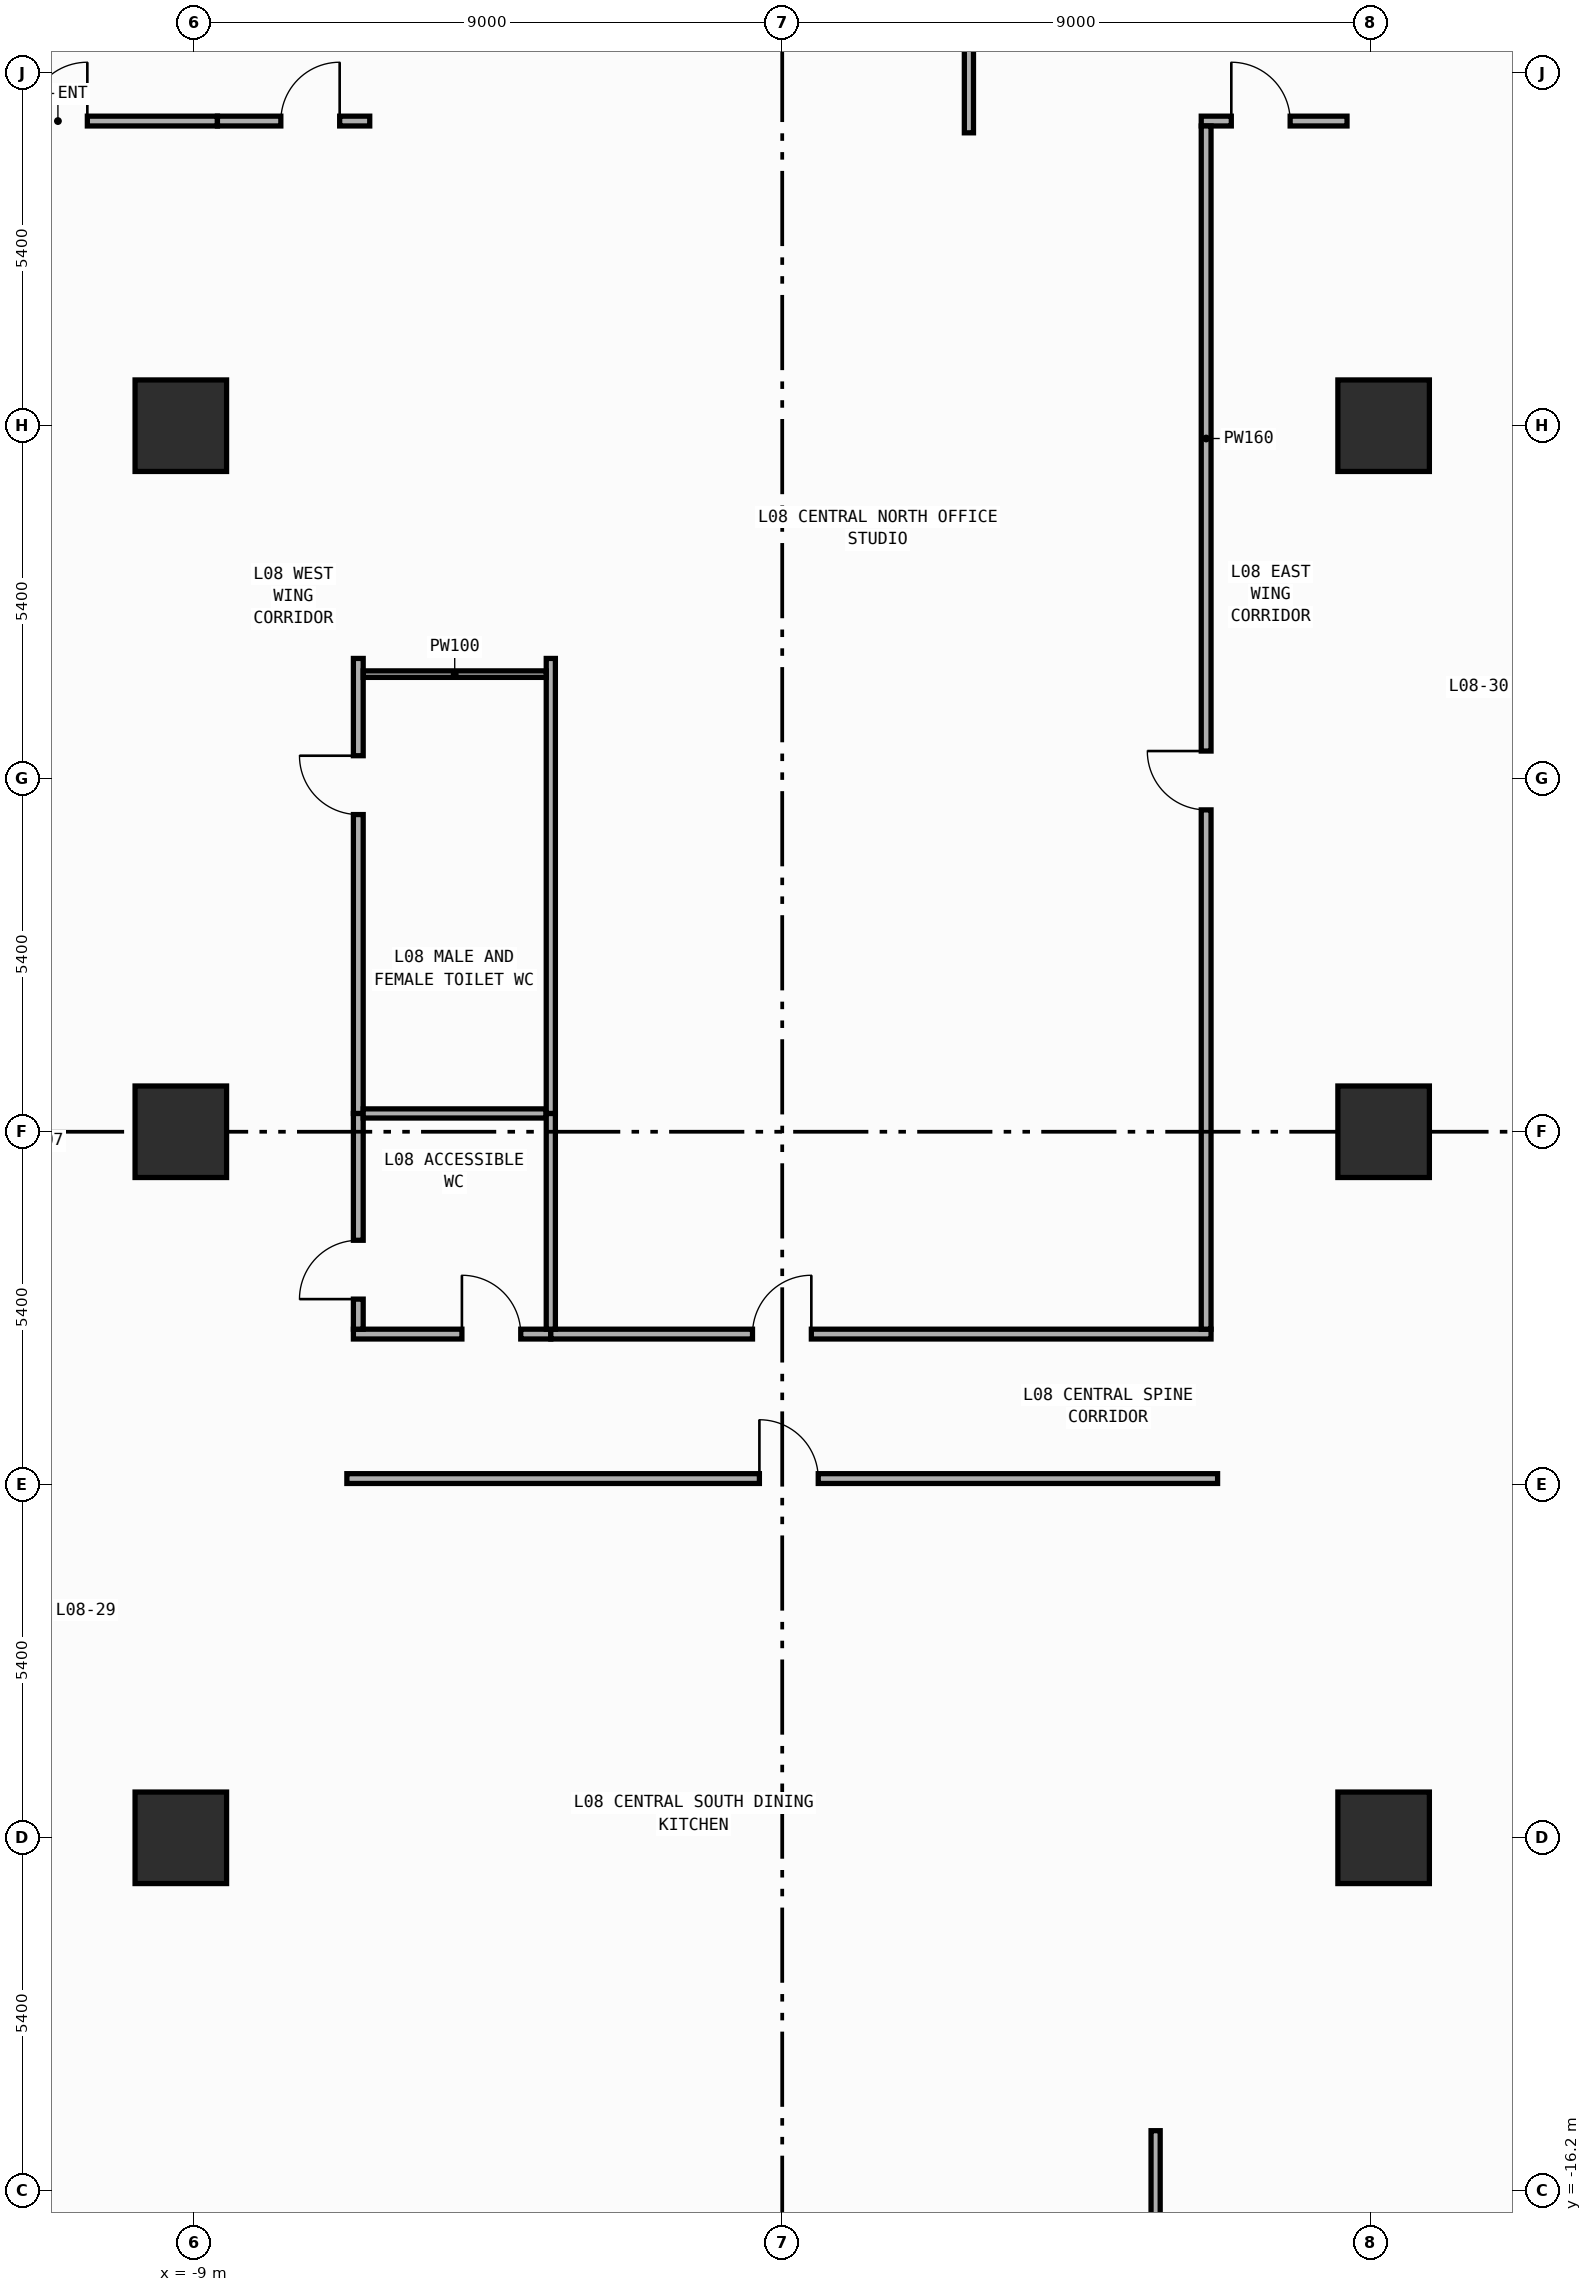
"""IFC4 building model, lengths in metres.
Left out: names, types, materials, properties, quantities, classifications, styles, units other than length and angle.
Written with IfcOpenShell. Run it as: python <this file> out.ifc"""

import sys

from ifc_helpers import new_model, si_unit, direction, frame, frame_2d, origin, origin_2d, place, context, subcontext, project, spatial, rectangle, extrude, element, fill, save


model = new_model("IFC4")
c1 = context("Model", 3, precision=1e-05, world=origin(), true_north=direction((0.0, 1.0)))
c2 = subcontext(c1, "Body", "Model", "MODEL_VIEW")
j1 = project(units=[si_unit("LENGTHUNIT", "METRE"), si_unit("PLANEANGLEUNIT", "RADIAN")], contexts=[c1])
p1 = place(None, origin())
s1 = spatial("IfcSite", under=j1, at=p1, CompositionType="ELEMENT")
p2 = place(p1, origin())
s2 = spatial("IfcBuilding", under=s1, at=p2, CompositionType="ELEMENT")
p3 = place(p2, frame((0.0, 0.0, 34.4)))
s3 = spatial("IfcBuildingStorey", under=s2, at=p3, CompositionType="ELEMENT", Elevation=34.4)
for number, where, z_axis, x_axis in (
    (1, (-9.2, -10.8, 0.0), (0.0, 0.0, 1.0), (1.0, 0.0, 0.0)),
    (2, (-9.2, 0.0, 0.0), (0.0, 0.0, 1.0), (1.0, 0.0, 0.0)),
    (3, (-9.2, 10.8, 0.0), (0.0, 0.0, 1.0), (1.0, 0.0, 0.0)),
    (4, (9.2, -10.8, 0.0), (0.0, 0.0, 1.0), (1.0, 0.0, 0.0)),
    (5, (9.2, 0.0, 0.0), (0.0, 0.0, 1.0), (1.0, 0.0, 0.0)),
    (6, (9.2, 10.8, 0.0), (0.0, 0.0, 1.0), (1.0, 0.0, 0.0)),
):
    element("IfcColumn", number, at=place(p3, frame(where, z_axis=z_axis, x_axis=x_axis)), inside=s3, PredefinedType="COLUMN", context=c2, shape_type="SweptSolid", body=[
        extrude(rectangle(XDim=1.4, YDim=1.4, at=origin_2d()), origin(), (0.0, 0.0, 1.0), 4.2),
    ])
p4 = place(p3, frame((-11.99, 15.46, 0.0), z_axis=(0.0, 0.0, 1.0), x_axis=(1.0, 0.0, 0.0)))
e7 = element("IfcWall", 7, at=p4, inside=s3, PredefinedType="PARTITIONING", context=c2, shape_type="SweptSolid", body=[
    extrude(rectangle(XDim=3.35, YDim=0.15, at=frame_2d((1.675, 0.0))), origin(), (0.0, 0.0, 1.0), 3.94),
])
p5 = place(p4, frame((0.46, 0.0, 0.0)))
e8 = element("IfcOpeningElement", 8, at=p5, cuts=e7, PredefinedType="OPENING", context=c2, shape_type="SweptSolid", body=[
    extrude(rectangle(XDim=0.9, YDim=2.15, at=frame_2d((0.45, 1.075))), frame((0.0, 0.085, 0.0), z_axis=(0.0, -1.0, 0.0), x_axis=(1.0, 0.0, 0.0)), (0.0, 0.0, 1.0), 0.17),
])
p6 = place(p3, frame((-6.56, -3.095, 0.0), z_axis=(0.0, 0.0, 1.0), x_axis=(1.0, 0.0, 0.0)))
e9 = element("IfcWall", 9, at=p6, inside=s3, PredefinedType="PARTITIONING", context=c2, shape_type="SweptSolid", body=[
    extrude(rectangle(XDim=3.02, YDim=0.15, at=frame_2d((1.51, 0.0))), origin(), (0.0, 0.0, 1.0), 3.94),
])
p7 = place(p6, frame((1.66, 0.0, 0.0)))
e10 = element("IfcOpeningElement", 10, at=p7, cuts=e9, PredefinedType="OPENING", context=c2, shape_type="SweptSolid", body=[
    extrude(rectangle(XDim=0.9, YDim=2.15, at=frame_2d((0.45, 1.075))), frame((0.0, 0.085, 0.0), z_axis=(0.0, -1.0, 0.0), x_axis=(1.0, 0.0, 0.0)), (0.0, 0.0, 1.0), 0.17),
])
p8 = place(p3, frame((-3.54, -3.095, 0.0), z_axis=(0.0, 0.0, 1.0), x_axis=(1.0, 0.0, 0.0)))
e11 = element("IfcWall", 11, at=p8, inside=s3, PredefinedType="PARTITIONING", context=c2, shape_type="SweptSolid", body=[
    extrude(rectangle(XDim=10.1, YDim=0.15, at=frame_2d((5.05, 0.0))), origin(), (0.0, 0.0, 1.0), 3.94),
])
p9 = place(p8, frame((3.085, 0.0, 0.0)))
e12 = element("IfcOpeningElement", 12, at=p9, cuts=e11, PredefinedType="OPENING", context=c2, shape_type="SweptSolid", body=[
    extrude(rectangle(XDim=0.9, YDim=2.15, at=frame_2d((0.45, 1.075))), frame((0.0, 0.085, 0.0), z_axis=(0.0, -1.0, 0.0), x_axis=(1.0, 0.0, 0.0)), (0.0, 0.0, 1.0), 0.17),
])
p10 = place(p3, frame((-6.66, -5.305, 0.0), z_axis=(0.0, 0.0, 1.0), x_axis=(1.0, 0.0, 0.0)))
e13 = element("IfcWall", 13, at=p10, inside=s3, PredefinedType="PARTITIONING", context=c2, shape_type="SweptSolid", body=[
    extrude(rectangle(XDim=13.32, YDim=0.15, at=frame_2d((6.66, 0.0))), origin(), (0.0, 0.0, 1.0), 3.94),
])
p11 = place(p10, frame((6.311, 0.0, 0.0)))
e14 = element("IfcOpeningElement", 14, at=p11, cuts=e13, PredefinedType="OPENING", context=c2, shape_type="SweptSolid", body=[
    extrude(rectangle(XDim=0.9, YDim=2.15, at=frame_2d((0.45, 1.075))), frame((0.0, 0.085, 0.0), z_axis=(0.0, -1.0, 0.0), x_axis=(1.0, 0.0, 0.0)), (0.0, 0.0, 1.0), 0.17),
])
p12 = place(p3, frame((-8.64, 15.46, 0.0), z_axis=(0.0, 0.0, 1.0), x_axis=(1.0, 0.0, 0.0)))
e15 = element("IfcWall", 15, at=p12, inside=s3, PredefinedType="PARTITIONING", context=c2, shape_type="SweptSolid", body=[
    extrude(rectangle(XDim=2.33, YDim=0.15, at=frame_2d((1.165, 0.0))), origin(), (0.0, 0.0, 1.0), 3.94),
])
p13 = place(p12, frame((0.97, 0.0, 0.0)))
e16 = element("IfcOpeningElement", 16, at=p13, cuts=e15, PredefinedType="OPENING", context=c2, shape_type="SweptSolid", body=[
    extrude(rectangle(XDim=0.9, YDim=2.15, at=frame_2d((0.45, 1.075))), frame((0.0, 0.085, 0.0), z_axis=(0.0, -1.0, 0.0), x_axis=(1.0, 0.0, 0.0)), (0.0, 0.0, 1.0), 0.17),
])
p14 = place(p3, frame((-6.485, -3.02, 0.0), z_axis=(0.0, 0.0, 1.0), x_axis=(0.0, 1.0, 0.0)))
e17 = element("IfcWall", 17, at=p14, inside=s3, PredefinedType="PARTITIONING", context=c2, shape_type="SweptSolid", body=[
    extrude(rectangle(XDim=3.3, YDim=0.15, at=frame_2d((1.65, 0.0))), origin(), (0.0, 0.0, 1.0), 3.94),
])
p15 = place(p14, frame((0.46, 0.0, 0.0)))
e18 = element("IfcOpeningElement", 18, at=p15, cuts=e17, PredefinedType="OPENING", context=c2, shape_type="SweptSolid", body=[
    extrude(rectangle(XDim=0.9, YDim=2.15, at=frame_2d((0.45, 1.075))), frame((0.0, 0.085, 0.0), z_axis=(0.0, -1.0, 0.0), x_axis=(1.0, 0.0, 0.0)), (0.0, 0.0, 1.0), 0.17),
])
p16 = place(p3, frame((-6.485, 0.28, 0.0), z_axis=(0.0, 0.0, 1.0), x_axis=(0.0, 1.0, 0.0)))
e19 = element("IfcWall", 19, at=p16, inside=s3, PredefinedType="PARTITIONING", context=c2, shape_type="SweptSolid", body=[
    extrude(rectangle(XDim=6.96, YDim=0.15, at=frame_2d((3.48, 0.0))), origin(), (0.0, 0.0, 1.0), 3.94),
])
p17 = place(p16, frame((4.572, 0.0, 0.0)))
e20 = element("IfcOpeningElement", 20, at=p17, cuts=e19, PredefinedType="OPENING", context=c2, shape_type="SweptSolid", body=[
    extrude(rectangle(XDim=0.9, YDim=2.15, at=frame_2d((0.45, 1.075))), frame((0.0, 0.085, 0.0), z_axis=(0.0, -1.0, 0.0), x_axis=(1.0, 0.0, 0.0)), (0.0, 0.0, 1.0), 0.17),
])
p18 = place(p3, frame((6.41, 15.46, 0.0), z_axis=(0.0, 0.0, 1.0), x_axis=(1.0, 0.0, 0.0)))
e21 = element("IfcWall", 21, at=p18, inside=s3, PredefinedType="PARTITIONING", context=c2, shape_type="SweptSolid", body=[
    extrude(rectangle(XDim=2.23, YDim=0.15, at=frame_2d((1.115, 0.0))), origin(), (0.0, 0.0, 1.0), 3.94),
])
p19 = place(p18, frame((0.46, 0.0, 0.0)))
e22 = element("IfcOpeningElement", 22, at=p19, cuts=e21, PredefinedType="OPENING", context=c2, shape_type="SweptSolid", body=[
    extrude(rectangle(XDim=0.9, YDim=2.15, at=frame_2d((0.45, 1.075))), frame((0.0, 0.085, 0.0), z_axis=(0.0, -1.0, 0.0), x_axis=(1.0, 0.0, 0.0)), (0.0, 0.0, 1.0), 0.17),
])
p20 = place(p3, frame((6.485, -3.02, 0.0), z_axis=(0.0, 0.0, 1.0), x_axis=(0.0, 1.0, 0.0)))
e23 = element("IfcWall", 23, at=p20, inside=s3, PredefinedType="PARTITIONING", context=c2, shape_type="SweptSolid", body=[
    extrude(rectangle(XDim=18.405, YDim=0.15, at=frame_2d((9.203, 0.0))), origin(), (0.0, 0.0, 1.0), 3.94),
])
p21 = place(p20, frame((7.944, 0.0, 0.0)))
e24 = element("IfcOpeningElement", 24, at=p21, cuts=e23, PredefinedType="OPENING", context=c2, shape_type="SweptSolid", body=[
    extrude(rectangle(XDim=0.9, YDim=2.15, at=frame_2d((0.45, 1.075))), frame((0.0, 0.085, 0.0), z_axis=(0.0, -1.0, 0.0), x_axis=(1.0, 0.0, 0.0)), (0.0, 0.0, 1.0), 0.17),
])
p22 = place(p3, frame((2.856, 15.28, 0.0), z_axis=(0.0, 0.0, 1.0), x_axis=(0.0, 1.0, 0.0)))
e25 = element("IfcWall", 25, at=p22, inside=s3, PredefinedType="PARTITIONING", context=c2, shape_type="SweptSolid", body=[
    extrude(rectangle(XDim=11.575, YDim=0.14, at=frame_2d((5.788, 0.0))), origin(), (0.0, 0.0, 1.0), 3.94),
])
p23 = place(p3, frame((5.712, -26.737, 0.0), z_axis=(0.0, 0.0, 1.0), x_axis=(0.0, 1.0, 0.0)))
e26 = element("IfcWall", 26, at=p23, inside=s3, PredefinedType="PARTITIONING", context=c2, shape_type="SweptSolid", body=[
    extrude(rectangle(XDim=11.457, YDim=0.14, at=frame_2d((5.729, 0.0))), origin(), (0.0, 0.0, 1.0), 3.94),
])
p24 = place(p23, frame((0.46, 0.0, 0.0)))
e27 = element("IfcOpeningElement", 27, at=p24, cuts=e26, PredefinedType="OPENING", context=c2, shape_type="SweptSolid", body=[
    extrude(rectangle(XDim=0.85, YDim=2.1, at=frame_2d((0.425, 1.05))), frame((0.0, 0.08, 0.0), z_axis=(0.0, -1.0, 0.0), x_axis=(1.0, 0.0, 0.0)), (0.0, 0.0, 1.0), 0.16),
])
p25 = place(p3, frame((-6.41, 0.28, 0.0), z_axis=(0.0, 0.0, 1.0), x_axis=(1.0, 0.0, 0.0)))
e28 = element("IfcWall", 28, at=p25, inside=s3, PredefinedType="PARTITIONING", context=c2, shape_type="SweptSolid", body=[
    extrude(rectangle(XDim=2.8, YDim=0.14, at=frame_2d((1.4, 0.0))), origin(), (0.0, 0.0, 1.0), 3.14),
])
p26 = place(p3, frame((-3.54, -3.02, 0.0), z_axis=(0.0, 0.0, 1.0), x_axis=(0.0, 1.0, 0.0)))
e29 = element("IfcWall", 29, at=p26, inside=s3, PredefinedType="PARTITIONING", context=c2, shape_type="SweptSolid", body=[
    extrude(rectangle(XDim=3.3, YDim=0.14, at=frame_2d((1.65, 0.0))), origin(), (0.0, 0.0, 1.0), 3.94),
])
p27 = place(p3, frame((-3.54, 0.28, 0.0), z_axis=(0.0, 0.0, 1.0), x_axis=(0.0, 1.0, 0.0)))
e30 = element("IfcWall", 30, at=p27, inside=s3, PredefinedType="PARTITIONING", context=c2, shape_type="SweptSolid", body=[
    extrude(rectangle(XDim=6.96, YDim=0.14, at=frame_2d((3.48, 0.0))), origin(), (0.0, 0.0, 1.0), 3.94),
])
p28 = place(p3, frame((-6.41, 7.0, 0.0), z_axis=(0.0, 0.0, 1.0), x_axis=(1.0, 0.0, 0.0)))
e31 = element("IfcWall", 31, at=p28, inside=s3, PredefinedType="PARTITIONING", context=c2, shape_type="SweptSolid", body=[
    extrude(rectangle(XDim=2.8, YDim=0.1, at=frame_2d((1.4, 0.0))), origin(), (0.0, 0.0, 1.0), 3.94),
])
p29 = place(p5, origin())
e32 = element("IfcDoor", 32, at=p29, inside=s3, OperationType="SINGLE_SWING_RIGHT", PredefinedType="DOOR", context=c2, shape_type="SweptSolid", body=[
    extrude(rectangle(XDim=0.9, YDim=2.15, at=frame_2d((0.45, 1.075))), frame((0.0, 0.025, 0.0), z_axis=(0.0, -1.0, 0.0), x_axis=(1.0, 0.0, 0.0)), (0.0, 0.0, 1.0), 0.05),
])
fill(e8, e32)
p30 = place(p7, origin())
e33 = element("IfcDoor", 33, at=p30, inside=s3, OperationType="SINGLE_SWING_LEFT", PredefinedType="DOOR", context=c2, shape_type="SweptSolid", body=[
    extrude(rectangle(XDim=0.9, YDim=2.15, at=frame_2d((0.45, 1.075))), frame((0.0, 0.025, 0.0), z_axis=(0.0, -1.0, 0.0), x_axis=(1.0, 0.0, 0.0)), (0.0, 0.0, 1.0), 0.05),
])
fill(e10, e33)
p31 = place(p9, origin())
e34 = element("IfcDoor", 34, at=p31, inside=s3, OperationType="SINGLE_SWING_RIGHT", PredefinedType="DOOR", context=c2, shape_type="SweptSolid", body=[
    extrude(rectangle(XDim=0.9, YDim=2.15, at=frame_2d((0.45, 1.075))), frame((0.0, 0.025, 0.0), z_axis=(0.0, -1.0, 0.0), x_axis=(1.0, 0.0, 0.0)), (0.0, 0.0, 1.0), 0.05),
])
fill(e12, e34)
p32 = place(p11, origin())
e35 = element("IfcDoor", 35, at=p32, inside=s3, OperationType="SINGLE_SWING_LEFT", PredefinedType="DOOR", context=c2, shape_type="SweptSolid", body=[
    extrude(rectangle(XDim=0.9, YDim=2.15, at=frame_2d((0.45, 1.075))), frame((0.0, 0.025, 0.0), z_axis=(0.0, -1.0, 0.0), x_axis=(1.0, 0.0, 0.0)), (0.0, 0.0, 1.0), 0.05),
])
fill(e14, e35)
p33 = place(p13, origin())
e36 = element("IfcDoor", 36, at=p33, inside=s3, OperationType="SINGLE_SWING_RIGHT", PredefinedType="DOOR", context=c2, shape_type="SweptSolid", body=[
    extrude(rectangle(XDim=0.9, YDim=2.15, at=frame_2d((0.45, 1.075))), frame((0.0, 0.025, 0.0), z_axis=(0.0, -1.0, 0.0), x_axis=(1.0, 0.0, 0.0)), (0.0, 0.0, 1.0), 0.05),
])
fill(e16, e36)
p34 = place(p15, origin())
e37 = element("IfcDoor", 37, at=p34, inside=s3, OperationType="SINGLE_SWING_LEFT", PredefinedType="DOOR", context=c2, shape_type="SweptSolid", body=[
    extrude(rectangle(XDim=0.9, YDim=2.15, at=frame_2d((0.45, 1.075))), frame((0.0, 0.025, 0.0), z_axis=(0.0, -1.0, 0.0), x_axis=(1.0, 0.0, 0.0)), (0.0, 0.0, 1.0), 0.05),
])
fill(e18, e37)
p35 = place(p17, origin())
e38 = element("IfcDoor", 38, at=p35, inside=s3, OperationType="SINGLE_SWING_RIGHT", PredefinedType="DOOR", context=c2, shape_type="SweptSolid", body=[
    extrude(rectangle(XDim=0.9, YDim=2.15, at=frame_2d((0.45, 1.075))), frame((0.0, 0.025, 0.0), z_axis=(0.0, -1.0, 0.0), x_axis=(1.0, 0.0, 0.0)), (0.0, 0.0, 1.0), 0.05),
])
fill(e20, e38)
p36 = place(p19, origin())
e39 = element("IfcDoor", 39, at=p36, inside=s3, OperationType="SINGLE_SWING_LEFT", PredefinedType="DOOR", context=c2, shape_type="SweptSolid", body=[
    extrude(rectangle(XDim=0.9, YDim=2.15, at=frame_2d((0.45, 1.075))), frame((0.0, 0.025, 0.0), z_axis=(0.0, -1.0, 0.0), x_axis=(1.0, 0.0, 0.0)), (0.0, 0.0, 1.0), 0.05),
])
fill(e22, e39)
p37 = place(p21, origin())
e40 = element("IfcDoor", 40, at=p37, inside=s3, OperationType="SINGLE_SWING_RIGHT", PredefinedType="DOOR", context=c2, shape_type="SweptSolid", body=[
    extrude(rectangle(XDim=0.9, YDim=2.15, at=frame_2d((0.45, 1.075))), frame((0.0, 0.025, 0.0), z_axis=(0.0, -1.0, 0.0), x_axis=(1.0, 0.0, 0.0)), (0.0, 0.0, 1.0), 0.05),
])
fill(e24, e40)
save(model, sys.argv[1])
